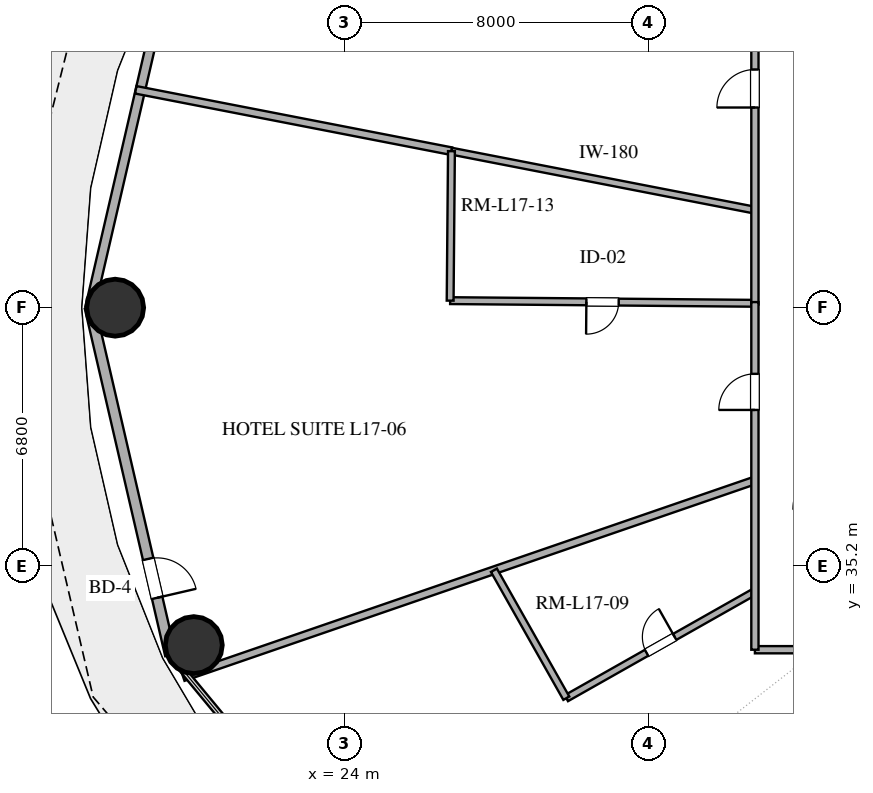
"""IFC4 building model, lengths in metres.
Left out: names, types, materials, properties, quantities, classifications, styles, units other than length and angle.
Written with IfcOpenShell. Run it as: python <this file> out.ifc"""

import sys

from ifc_helpers import new_model, si_unit, direction, frame, frame_2d, origin, origin_2d, place, context, subcontext, project, spatial, rectangle, hollow_circle, extrude, element, fill, save


model = new_model("IFC4")
c1 = context("Model", 3, precision=1e-05, world=origin(), true_north=direction((0.0, 1.0)))
c2 = subcontext(c1, "Body", "Model", "MODEL_VIEW")
j1 = project(units=[si_unit("LENGTHUNIT", "METRE"), si_unit("PLANEANGLEUNIT", "RADIAN")], contexts=[c1])
p1 = place(None, origin())
s1 = spatial("IfcSite", under=j1, at=p1, CompositionType="ELEMENT")
p2 = place(p1, origin())
s2 = spatial("IfcBuilding", under=s1, at=p2, CompositionType="ELEMENT")
p3 = place(p2, frame((0.0, 0.0, 71.4)))
s3 = spatial("IfcBuildingStorey", under=s2, at=p3, CompositionType="ELEMENT", Elevation=71.4)
for number, where, z_axis, x_axis in (
    (1, (17.965, 42.0, 0.0), (0.0, 0.0, 1.0), (1.0, 0.0, 0.0)),
    (2, (20.034, 33.122, 0.0), (0.0, 0.0, 1.0), (1.0, 0.0, 0.0)),
):
    element("IfcColumn", number, at=place(p3, frame(where, z_axis=z_axis, x_axis=x_axis)), inside=s3, PredefinedType="COLUMN", context=c2, shape_type="SweptSolid", body=[
        extrude(hollow_circle(Radius=0.75, WallThickness=0.04, at=origin_2d()), origin(), (0.0, 0.0, 1.0), 3.38),
    ])
p4 = place(p3, frame((19.419, 51.138, 0.0), z_axis=(0.0, 0.0, 1.0), x_axis=(-0.225454452941, -0.974253709076, 0.0)))
e3 = element("IfcWall", 3, at=p4, inside=s3, PredefinedType="SOLIDWALL", context=c2, shape_type="SweptSolid", body=[
    extrude(rectangle(XDim=9.38, YDim=0.25, at=frame_2d((4.69, 0.0))), origin(), (0.0, 0.0, 1.0), 3.38),
])
p5 = place(p3, frame((17.304, 42.0, 0.0), z_axis=(0.0, 0.0, 1.0), x_axis=(0.225454452941, -0.974253709076, 0.0)))
e4 = element("IfcWall", 4, at=p5, inside=s3, PredefinedType="SOLIDWALL", context=c2, shape_type="SweptSolid", body=[
    extrude(rectangle(XDim=9.38, YDim=0.28, at=frame_2d((4.69, 0.0))), origin(), (0.0, 0.0, 1.0), 3.38),
])
p6 = place(p5, frame((6.785, 0.0, 0.0)))
e5 = element("IfcOpeningElement", 5, at=p6, cuts=e4, PredefinedType="OPENING", context=c2, shape_type="SweptSolid", body=[
    extrude(rectangle(XDim=1.05, YDim=2.2, at=frame_2d((0.525, 1.1))), frame((0.0, 0.15, 0.0), z_axis=(0.0, -1.0, 0.0), x_axis=(1.0, 0.0, 0.0)), (0.0, 0.0, 1.0), 0.3),
])
p7 = place(p3, frame((34.8, 37.455, 0.0), z_axis=(0.0, 0.0, 1.0), x_axis=(-0.945518845989, -0.325567369186, 0.0)))
e6 = element("IfcWall", 6, at=p7, inside=s3, PredefinedType="PARTITIONING", context=c2, shape_type="SweptSolid", body=[
    extrude(rectangle(XDim=15.909, YDim=0.2, at=frame_2d((7.955, 0.0))), origin(), (0.0, 0.0, 1.0), 2.74),
])
p8 = place(p3, frame((18.508, 47.733, 0.0), z_axis=(0.0, 0.0, 1.0), x_axis=(0.981626048747, -0.190814832812, 0.0)))
e7 = element("IfcWall", 7, at=p8, inside=s3, PredefinedType="PARTITIONING", context=c2, shape_type="SweptSolid", body=[
    extrude(rectangle(XDim=8.462, YDim=0.2, at=frame_2d((4.231, 0.0))), origin(), (0.0, 0.0, 1.0), 2.74),
])
p9 = place(p3, frame((40.177, 33.0, 0.0), z_axis=(0.0, 0.0, 1.0), x_axis=(-0.656066321773, -0.754703240641, 0.0)))
e8 = element("IfcWall", 8, at=p9, inside=s3, PredefinedType="PARTITIONING", context=c2, shape_type="SweptSolid", body=[
    extrude(rectangle(XDim=14.091, YDim=0.2, at=frame_2d((7.045, 0.0))), origin(), (0.0, 0.0, 1.0), 2.74),
])
p10 = place(p3, frame((26.815, 46.118, 0.0), z_axis=(0.0, 0.0, 1.0), x_axis=(0.981631630513, -0.190786115787, 0.0)))
e9 = element("IfcWall", 9, at=p10, inside=s3, PredefinedType="PLUMBINGWALL", context=c2, shape_type="SweptSolid", body=[
    extrude(rectangle(XDim=8.135, YDim=0.18, at=frame_2d((4.067, 0.0))), origin(), (0.0, 0.0, 1.0), 2.74),
])
p11 = place(p3, frame((34.8, 42.115, 0.0), z_axis=(0.0, 0.0, 1.0), x_axis=(-0.999961832732, 0.008736880358, 0.0)))
e10 = element("IfcWall", 10, at=p11, inside=s3, PredefinedType="PLUMBINGWALL", context=c2, shape_type="SweptSolid", body=[
    extrude(rectangle(XDim=8.02, YDim=0.18, at=frame_2d((4.01, 0.0))), origin(), (0.0, 0.0, 1.0), 2.74),
])
p12 = place(p11, frame((3.585, 0.0, 0.0)))
e11 = element("IfcOpeningElement", 11, at=p12, cuts=e10, PredefinedType="OPENING", context=c2, shape_type="SweptSolid", body=[
    extrude(rectangle(XDim=0.85, YDim=2.1, at=frame_2d((0.425, 1.05))), frame((0.0, 0.1, 0.0), z_axis=(0.0, -1.0, 0.0), x_axis=(1.0, 0.0, 0.0)), (0.0, 0.0, 1.0), 0.2),
])
p13 = place(p3, frame((34.8, 42.083, 0.0), z_axis=(0.0, 0.0, 1.0), x_axis=(0.0, 1.0, 0.0)))
e12 = element("IfcWall", 12, at=p13, inside=s3, PredefinedType="PARTITIONING", context=c2, shape_type="SweptSolid", body=[
    extrude(rectangle(XDim=8.917, YDim=0.19, at=frame_2d((4.458, 0.0))), origin(), (0.0, 0.0, 1.0), 2.74),
])
p14 = place(p13, frame((5.183, 0.0, 0.0)))
e13 = element("IfcOpeningElement", 13, at=p14, cuts=e12, PredefinedType="OPENING", context=c2, shape_type="SweptSolid", body=[
    extrude(rectangle(XDim=1.0, YDim=2.2, at=frame_2d((0.5, 1.1))), frame((0.0, 0.105, 0.0), z_axis=(0.0, -1.0, 0.0), x_axis=(1.0, 0.0, 0.0)), (0.0, 0.0, 1.0), 0.21),
])
p15 = place(p3, frame((29.837, 31.724, 0.0), z_axis=(0.0, 0.0, 1.0), x_axis=(0.870364197206, 0.492408533865, 0.0)))
e14 = element("IfcWall", 14, at=p15, inside=s3, PredefinedType="PLUMBINGWALL", context=c2, shape_type="SweptSolid", body=[
    extrude(rectangle(XDim=5.702, YDim=0.18, at=frame_2d((2.851, 0.0))), origin(), (0.0, 0.0, 1.0), 2.74),
])
p16 = place(p15, frame((2.426, 0.0, 0.0)))
e15 = element("IfcOpeningElement", 15, at=p16, cuts=e14, PredefinedType="OPENING", context=c2, shape_type="SweptSolid", body=[
    extrude(rectangle(XDim=0.85, YDim=2.1, at=frame_2d((0.425, 1.05))), frame((0.0, 0.1, 0.0), z_axis=(0.0, -1.0, 0.0), x_axis=(1.0, 0.0, 0.0)), (0.0, 0.0, 1.0), 0.2),
])
p17 = place(p3, frame((42.736, 33.0, 0.0), z_axis=(0.0, 0.0, 1.0), x_axis=(-1.0, 0.0, 0.0)))
e16 = element("IfcWall", 16, at=p17, inside=s3, PredefinedType="PARTITIONING", context=c2, shape_type="SweptSolid", body=[
    extrude(rectangle(XDim=7.936, YDim=0.19, at=frame_2d((3.968, 0.0))), origin(), (0.0, 0.0, 1.0), 2.74),
])
p18 = place(p17, frame((4.751, 0.0, 0.0)))
e17 = element("IfcOpeningElement", 17, at=p18, cuts=e16, PredefinedType="OPENING", context=c2, shape_type="SweptSolid", body=[
    extrude(rectangle(XDim=0.95, YDim=2.15, at=frame_2d((0.475, 1.075))), frame((0.0, 0.105, 0.0), z_axis=(0.0, -1.0, 0.0), x_axis=(1.0, 0.0, 0.0)), (0.0, 0.0, 1.0), 0.21),
])
p19 = place(p3, frame((34.8, 33.0, 0.0), z_axis=(0.0, 0.0, 1.0), x_axis=(0.0, 1.0, 0.0)))
e18 = element("IfcWall", 18, at=p19, inside=s3, PredefinedType="PARTITIONING", context=c2, shape_type="SweptSolid", body=[
    extrude(rectangle(XDim=9.147, YDim=0.19, at=frame_2d((4.574, 0.0))), origin(), (0.0, 0.0, 1.0), 2.74),
])
p20 = place(p19, frame((6.309, 0.0, 0.0)))
e19 = element("IfcOpeningElement", 19, at=p20, cuts=e18, PredefinedType="OPENING", context=c2, shape_type="SweptSolid", body=[
    extrude(rectangle(XDim=0.95, YDim=2.15, at=frame_2d((0.475, 1.075))), frame((0.0, 0.105, 0.0), z_axis=(0.0, -1.0, 0.0), x_axis=(1.0, 0.0, 0.0)), (0.0, 0.0, 1.0), 0.21),
])
p21 = place(p3, frame((26.781, 42.185, 0.0), z_axis=(0.0, 0.0, 1.0), x_axis=(0.008691005249, 0.999962232501, 0.0)))
e20 = element("IfcWall", 20, at=p21, inside=s3, PredefinedType="PLUMBINGWALL", context=c2, shape_type="SweptSolid", body=[
    extrude(rectangle(XDim=3.933, YDim=0.18, at=frame_2d((1.966, 0.0))), origin(), (0.0, 0.0, 1.0), 2.74),
])
p22 = place(p3, frame((27.933, 35.09, 0.0), z_axis=(0.0, 0.0, 1.0), x_axis=(0.492429534147, -0.870352315962, 0.0)))
e21 = element("IfcWall", 21, at=p22, inside=s3, PredefinedType="PLUMBINGWALL", context=c2, shape_type="SweptSolid", body=[
    extrude(rectangle(XDim=3.868, YDim=0.18, at=frame_2d((1.934, 0.0))), origin(), (0.0, 0.0, 1.0), 2.74),
])
p23 = place(p6, origin())
e22 = element("IfcDoor", 22, at=p23, inside=s3, OperationType="SINGLE_SWING_RIGHT", PredefinedType="DOOR", context=c2, shape_type="SweptSolid", body=[
    extrude(rectangle(XDim=1.05, YDim=2.2, at=frame_2d((0.525, 1.1))), frame((0.0, 0.025, 0.0), z_axis=(0.0, -1.0, 0.0), x_axis=(1.0, 0.0, 0.0)), (0.0, 0.0, 1.0), 0.05),
])
fill(e5, e22)
p24 = place(p12, origin())
e23 = element("IfcDoor", 23, at=p24, inside=s3, OperationType="SINGLE_SWING_RIGHT", PredefinedType="DOOR", context=c2, shape_type="SweptSolid", body=[
    extrude(rectangle(XDim=0.85, YDim=2.1, at=frame_2d((0.425, 1.05))), frame((0.0, 0.025, 0.0), z_axis=(0.0, -1.0, 0.0), x_axis=(1.0, 0.0, 0.0)), (0.0, 0.0, 1.0), 0.05),
])
fill(e11, e23)
p25 = place(p14, origin())
e24 = element("IfcDoor", 24, at=p25, inside=s3, OperationType="SINGLE_SWING_LEFT", PredefinedType="DOOR", context=c2, shape_type="SweptSolid", body=[
    extrude(rectangle(XDim=1.0, YDim=2.2, at=frame_2d((0.5, 1.1))), frame((0.0, 0.025, 0.0), z_axis=(0.0, -1.0, 0.0), x_axis=(1.0, 0.0, 0.0)), (0.0, 0.0, 1.0), 0.05),
])
fill(e13, e24)
p26 = place(p16, origin())
e25 = element("IfcDoor", 25, at=p26, inside=s3, OperationType="SINGLE_SWING_RIGHT", PredefinedType="DOOR", context=c2, shape_type="SweptSolid", body=[
    extrude(rectangle(XDim=0.85, YDim=2.1, at=frame_2d((0.425, 1.05))), frame((0.0, 0.025, 0.0), z_axis=(0.0, -1.0, 0.0), x_axis=(1.0, 0.0, 0.0)), (0.0, 0.0, 1.0), 0.05),
])
fill(e15, e25)
p27 = place(p20, origin())
e26 = element("IfcDoor", 26, at=p27, inside=s3, OperationType="SINGLE_SWING_LEFT", PredefinedType="DOOR", context=c2, shape_type="SweptSolid", body=[
    extrude(rectangle(XDim=0.95, YDim=2.15, at=frame_2d((0.475, 1.075))), frame((0.0, 0.025, 0.0), z_axis=(0.0, -1.0, 0.0), x_axis=(1.0, 0.0, 0.0)), (0.0, 0.0, 1.0), 0.05),
])
fill(e19, e26)
save(model, sys.argv[1])
